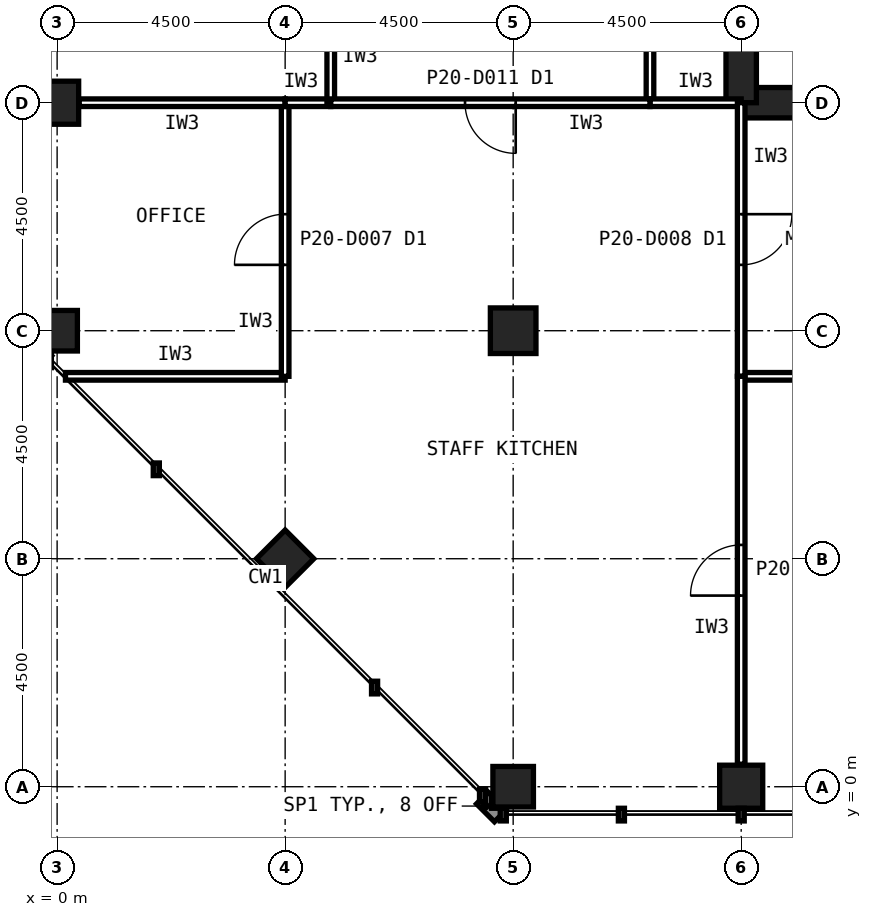
"""IFC4 building model, lengths in metres.
Left out: names, types, materials, properties, quantities, classifications, styles, units other than length and angle.
Written with IfcOpenShell. Run it as: python <this file> out.ifc"""

import sys

from ifc_helpers import new_model, si_unit, direction, frame, frame_2d, origin, origin_2d, place, context, subcontext, project, spatial, rectangle, hollow_rectangle, extrude, element, fill, save


model = new_model("IFC4")
c1 = context("Model", 3, precision=1e-05, world=origin(), true_north=direction((0.0, 1.0)))
c2 = subcontext(c1, "Body", "Model", "MODEL_VIEW")
j1 = project(units=[si_unit("LENGTHUNIT", "METRE"), si_unit("PLANEANGLEUNIT", "RADIAN")], contexts=[c1])
p1 = place(None, origin())
s1 = spatial("IfcSite", under=j1, at=p1, CompositionType="ELEMENT")
p2 = place(p1, origin())
s2 = spatial("IfcBuilding", under=s1, at=p2, CompositionType="ELEMENT")
p3 = place(p2, frame((0.0, 0.0, 87.8)))
s3 = spatial("IfcBuildingStorey", under=s2, at=p3, CompositionType="ELEMENT", Elevation=87.8)
p4 = place(p3, frame((9.0, 0.0, 0.0), z_axis=(0.0, 0.0, 1.0), x_axis=(1.0, 0.0, 0.0)))
e1 = element("IfcColumn", 1, at=p4, inside=s3, PredefinedType="COLUMN", context=c2, shape_type="SweptSolid", body=[
    extrude(hollow_rectangle(XDim=0.8, YDim=0.8, WallThickness=0.045, at=origin_2d()), origin(), (0.0, 0.0, 1.0), 4.2),
])
for number, where, z_axis, x_axis in (
    (2, (13.5, 0.0, 0.0), (0.0, 0.0, 1.0), (1.0, 0.0, 0.0)),
    (3, (0.0, 13.5, 0.0), (0.0, 0.0, 1.0), (1.0, 0.0, 0.0)),
):
    element("IfcColumn", number, at=place(p3, frame(where, z_axis=z_axis, x_axis=x_axis)), inside=s3, PredefinedType="COLUMN", context=c2, shape_type="SweptSolid", body=[
        extrude(hollow_rectangle(XDim=0.85, YDim=0.85, WallThickness=0.05, at=origin_2d()), origin(), (0.0, 0.0, 1.0), 4.2),
    ])
for number, where, z_axis, x_axis in (
    (4, (0.0, 9.0, 0.0), (0.0, 0.0, 1.0), (1.0, 0.0, 0.0)),
    (5, (4.5, 4.5, 0.0), (0.0, 0.0, 1.0), (0.707, 0.707, 0.0)),
):
    element("IfcColumn", number, at=place(p3, frame(where, z_axis=z_axis, x_axis=x_axis)), inside=s3, PredefinedType="COLUMN", context=c2, shape_type="SweptSolid", body=[
        extrude(hollow_rectangle(XDim=0.8, YDim=0.8, WallThickness=0.045, at=origin_2d()), origin(), (0.0, 0.0, 1.0), 4.2),
    ])
p5 = place(p3, frame((9.0, 9.0, 0.0), z_axis=(0.0, 0.0, 1.0), x_axis=(1.0, 0.0, 0.0)))
e6 = element("IfcColumn", 6, at=p5, inside=s3, PredefinedType="COLUMN", context=c2, shape_type="SweptSolid", body=[
    extrude(hollow_rectangle(XDim=0.9, YDim=0.9, WallThickness=0.063, at=origin_2d()), origin(), (0.0, 0.0, 1.0), 4.2),
])
p6 = place(p3, frame((13.5, 13.5, 0.0), z_axis=(0.0, 0.0, 1.0), x_axis=(1.0, 0.0, 0.0)))
e7 = element("IfcWall", 7, at=p6, inside=s3, PredefinedType="SHEAR", context=c2, shape_type="SweptSolid", body=[
    extrude(rectangle(XDim=27.0, YDim=0.6, at=frame_2d((13.5, 0.0))), origin(), (0.0, 0.0, 1.0), 4.2),
])
p7 = place(p3, frame((13.5, 40.5, 0.0), z_axis=(0.0, 0.0, 1.0), x_axis=(0.0, -1.0, 0.0)))
e8 = element("IfcWall", 8, at=p7, inside=s3, PredefinedType="SHEAR", context=c2, shape_type="SweptSolid", body=[
    extrude(rectangle(XDim=27.0, YDim=0.6, at=frame_2d((13.5, 0.0))), origin(), (0.0, 0.0, 1.0), 4.2),
])
p8 = place(p7, frame((19.65, 0.0, 0.0)))
e9 = element("IfcOpeningElement", 9, at=p8, cuts=e8, PredefinedType="OPENING", context=c2, shape_type="SweptSolid", body=[
    extrude(rectangle(XDim=1.2, YDim=2.1, at=frame_2d((0.6, 1.05))), frame((0.0, 0.31, 0.0), z_axis=(0.0, -1.0, 0.0), x_axis=(1.0, 0.0, 0.0)), (0.0, 0.0, 1.0), 0.62),
])
p9 = place(p7, frame((5.85, 0.0, 0.0)))
e10 = element("IfcOpeningElement", 10, at=p9, cuts=e8, PredefinedType="OPENING", context=c2, shape_type="SweptSolid", body=[
    extrude(rectangle(XDim=1.8, YDim=2.1, at=frame_2d((0.9, 1.05))), frame((0.0, 0.31, 0.0), z_axis=(0.0, -1.0, 0.0), x_axis=(1.0, 0.0, 0.0)), (0.0, 0.0, 1.0), 0.62),
])
p10 = place(p3, frame((11.7, 40.5, 0.0), z_axis=(0.0, 0.0, 1.0), x_axis=(0.0, -1.0, 0.0)))
e11 = element("IfcWall", 11, at=p10, inside=s3, PredefinedType="PARTITIONING", context=c2, shape_type="SweptSolid", body=[
    extrude(rectangle(XDim=27.0, YDim=0.15, at=frame_2d((13.5, 0.0))), origin(), (0.0, 0.0, 1.0), 4.04),
])
p11 = place(p10, frame((13.0, 0.0, 0.0)))
e12 = element("IfcOpeningElement", 12, at=p11, cuts=e11, PredefinedType="OPENING", context=c2, shape_type="SweptSolid", body=[
    extrude(rectangle(XDim=1.0, YDim=2.1, at=frame_2d((0.5, 1.05))), frame((0.0, 0.085, 0.0), z_axis=(0.0, -1.0, 0.0), x_axis=(1.0, 0.0, 0.0)), (0.0, 0.0, 1.0), 0.17),
])
p12 = place(p3, frame((11.7, 13.5, 0.0), z_axis=(0.0, 0.0, 1.0), x_axis=(1.0, 0.0, 0.0)))
e13 = element("IfcWall", 13, at=p12, inside=s3, PredefinedType="PARTITIONING", context=c2, shape_type="SweptSolid", body=[
    extrude(rectangle(XDim=1.8, YDim=0.15, at=frame_2d((0.9, 0.0))), origin(), (0.0, 0.0, 1.0), 3.189),
])
p13 = place(p3, frame((0.165, 8.1, 0.0), z_axis=(0.0, 0.0, 1.0), x_axis=(1.0, 0.0, 0.0)))
e14 = element("IfcWall", 14, at=p13, inside=s3, PredefinedType="PARTITIONING", context=c2, shape_type="SweptSolid", body=[
    extrude(rectangle(XDim=4.335, YDim=0.15, at=frame_2d((2.168, 0.0))), origin(), (0.0, 0.0, 1.0), 4.04),
])
p14 = place(p3, frame((4.5, 8.1, 0.0), z_axis=(0.0, 0.0, 1.0), x_axis=(0.0, 1.0, 0.0)))
e15 = element("IfcWall", 15, at=p14, inside=s3, PredefinedType="PARTITIONING", context=c2, shape_type="SweptSolid", body=[
    extrude(rectangle(XDim=5.4, YDim=0.15, at=frame_2d((2.7, 0.0))), origin(), (0.0, 0.0, 1.0), 4.04),
])
p15 = place(p14, frame((2.2, 0.0, 0.0)))
e16 = element("IfcOpeningElement", 16, at=p15, cuts=e15, PredefinedType="OPENING", context=c2, shape_type="SweptSolid", body=[
    extrude(rectangle(XDim=1.0, YDim=2.1, at=frame_2d((0.5, 1.05))), frame((0.0, 0.085, 0.0), z_axis=(0.0, -1.0, 0.0), x_axis=(1.0, 0.0, 0.0)), (0.0, 0.0, 1.0), 0.17),
])
p16 = place(p3, frame((4.5, 13.5, 0.0), z_axis=(0.0, 0.0, 1.0), x_axis=(-1.0, 0.0, 0.0)))
e17 = element("IfcWall", 17, at=p16, inside=s3, PredefinedType="PARTITIONING", context=c2, shape_type="SweptSolid", body=[
    extrude(rectangle(XDim=4.065, YDim=0.15, at=frame_2d((2.032, 0.0))), origin(), (0.0, 0.0, 1.0), 3.189),
])
p17 = place(p3, frame((4.5, 13.5, 0.0), z_axis=(0.0, 0.0, 1.0), x_axis=(1.0, 0.0, 0.0)))
e18 = element("IfcWall", 18, at=p17, inside=s3, PredefinedType="PARTITIONING", context=c2, shape_type="SweptSolid", body=[
    extrude(rectangle(XDim=0.9, YDim=0.15, at=frame_2d((0.45, 0.0))), origin(), (0.0, 0.0, 1.0), 3.189),
])
p18 = place(p3, frame((5.4, 13.5, 0.0), z_axis=(0.0, 0.0, 1.0), x_axis=(0.0, 1.0, 0.0)))
e19 = element("IfcWall", 19, at=p18, inside=s3, PredefinedType="PARTITIONING", context=c2, shape_type="SweptSolid", body=[
    extrude(rectangle(XDim=4.5, YDim=0.15, at=frame_2d((2.25, 0.0))), origin(), (0.0, 0.0, 1.0), 4.04),
])
p19 = place(p18, frame((1.75, 0.0, 0.0)))
e20 = element("IfcOpeningElement", 20, at=p19, cuts=e19, PredefinedType="OPENING", context=c2, shape_type="SweptSolid", body=[
    extrude(rectangle(XDim=1.0, YDim=2.1, at=frame_2d((0.5, 1.05))), frame((0.0, 0.085, 0.0), z_axis=(0.0, -1.0, 0.0), x_axis=(1.0, 0.0, 0.0)), (0.0, 0.0, 1.0), 0.17),
])
p20 = place(p3, frame((13.5, 8.1, 0.0), z_axis=(0.0, 0.0, 1.0), x_axis=(1.0, 0.0, 0.0)))
e21 = element("IfcWall", 21, at=p20, inside=s3, PredefinedType="PARTITIONING", context=c2, shape_type="SweptSolid", body=[
    extrude(rectangle(XDim=4.5, YDim=0.15, at=frame_2d((2.25, 0.0))), origin(), (0.0, 0.0, 1.0), 4.04),
])
p21 = place(p3, frame((13.5, 13.5, 0.0), z_axis=(0.0, 0.0, 1.0), x_axis=(0.0, -1.0, 0.0)))
e22 = element("IfcWall", 22, at=p21, inside=s3, PredefinedType="PARTITIONING", context=c2, shape_type="SweptSolid", body=[
    extrude(rectangle(XDim=5.4, YDim=0.15, at=frame_2d((2.7, 0.0))), origin(), (0.0, 0.0, 1.0), 3.189),
])
p22 = place(p21, frame((2.2, 0.0, 0.0)))
e23 = element("IfcOpeningElement", 23, at=p22, cuts=e22, PredefinedType="OPENING", context=c2, shape_type="SweptSolid", body=[
    extrude(rectangle(XDim=1.0, YDim=2.1, at=frame_2d((0.5, 1.05))), frame((0.0, 0.085, 0.0), z_axis=(0.0, -1.0, 0.0), x_axis=(1.0, 0.0, 0.0)), (0.0, 0.0, 1.0), 0.17),
])
p23 = place(p3, frame((13.5, 0.445, 0.0), z_axis=(0.0, 0.0, 1.0), x_axis=(0.0, 1.0, 0.0)))
e24 = element("IfcWall", 24, at=p23, inside=s3, PredefinedType="PARTITIONING", context=c2, shape_type="SweptSolid", body=[
    extrude(rectangle(XDim=7.655, YDim=0.15, at=frame_2d((3.828, 0.0))), origin(), (0.0, 0.0, 1.0), 3.189),
])
p24 = place(p23, frame((3.327, 0.0, 0.0)))
e25 = element("IfcOpeningElement", 25, at=p24, cuts=e24, PredefinedType="OPENING", context=c2, shape_type="SweptSolid", body=[
    extrude(rectangle(XDim=1.0, YDim=2.1, at=frame_2d((0.5, 1.05))), frame((0.0, 0.085, 0.0), z_axis=(0.0, -1.0, 0.0), x_axis=(1.0, 0.0, 0.0)), (0.0, 0.0, 1.0), 0.17),
])
p25 = place(p3, frame((11.7, 13.5, 0.0), z_axis=(0.0, 0.0, 1.0), x_axis=(-1.0, 0.0, 0.0)))
e26 = element("IfcWall", 26, at=p25, inside=s3, PredefinedType="PARTITIONING", context=c2, shape_type="SweptSolid", body=[
    extrude(rectangle(XDim=6.3, YDim=0.15, at=frame_2d((3.15, 0.0))), origin(), (0.0, 0.0, 1.0), 3.189),
])
p26 = place(p25, frame((2.65, 0.0, 0.0)))
e27 = element("IfcOpeningElement", 27, at=p26, cuts=e26, PredefinedType="OPENING", context=c2, shape_type="SweptSolid", body=[
    extrude(rectangle(XDim=1.0, YDim=2.1, at=frame_2d((0.5, 1.05))), frame((0.0, 0.085, 0.0), z_axis=(0.0, -1.0, 0.0), x_axis=(1.0, 0.0, 0.0)), (0.0, 0.0, 1.0), 0.17),
])
p27 = place(p15, origin())
e28 = element("IfcDoor", 28, at=p27, inside=s3, OperationType="SINGLE_SWING_LEFT", PredefinedType="DOOR", context=c2, shape_type="SweptSolid", body=[
    extrude(rectangle(XDim=1.0, YDim=2.1, at=frame_2d((0.5, 1.05))), frame((0.0, 0.025, 0.0), z_axis=(0.0, -1.0, 0.0), x_axis=(1.0, 0.0, 0.0)), (0.0, 0.0, 1.0), 0.05),
])
fill(e16, e28)
p28 = place(p22, origin())
e29 = element("IfcDoor", 29, at=p28, inside=s3, OperationType="SINGLE_SWING_LEFT", PredefinedType="DOOR", context=c2, shape_type="SweptSolid", body=[
    extrude(rectangle(XDim=1.0, YDim=2.1, at=frame_2d((0.5, 1.05))), frame((0.0, 0.025, 0.0), z_axis=(0.0, -1.0, 0.0), x_axis=(1.0, 0.0, 0.0)), (0.0, 0.0, 1.0), 0.05),
])
fill(e23, e29)
p29 = place(p24, origin())
e30 = element("IfcDoor", 30, at=p29, inside=s3, OperationType="SINGLE_SWING_LEFT", PredefinedType="DOOR", context=c2, shape_type="SweptSolid", body=[
    extrude(rectangle(XDim=1.0, YDim=2.1, at=frame_2d((0.5, 1.05))), frame((0.0, 0.025, 0.0), z_axis=(0.0, -1.0, 0.0), x_axis=(1.0, 0.0, 0.0)), (0.0, 0.0, 1.0), 0.05),
])
fill(e25, e30)
p30 = place(p26, origin())
e31 = element("IfcDoor", 31, at=p30, inside=s3, OperationType="SINGLE_SWING_LEFT", PredefinedType="DOOR", context=c2, shape_type="SweptSolid", body=[
    extrude(rectangle(XDim=1.0, YDim=2.1, at=frame_2d((0.5, 1.05))), frame((0.0, 0.025, 0.0), z_axis=(0.0, -1.0, 0.0), x_axis=(1.0, 0.0, 0.0)), (0.0, 0.0, 1.0), 0.05),
])
fill(e27, e31)
save(model, sys.argv[1])
